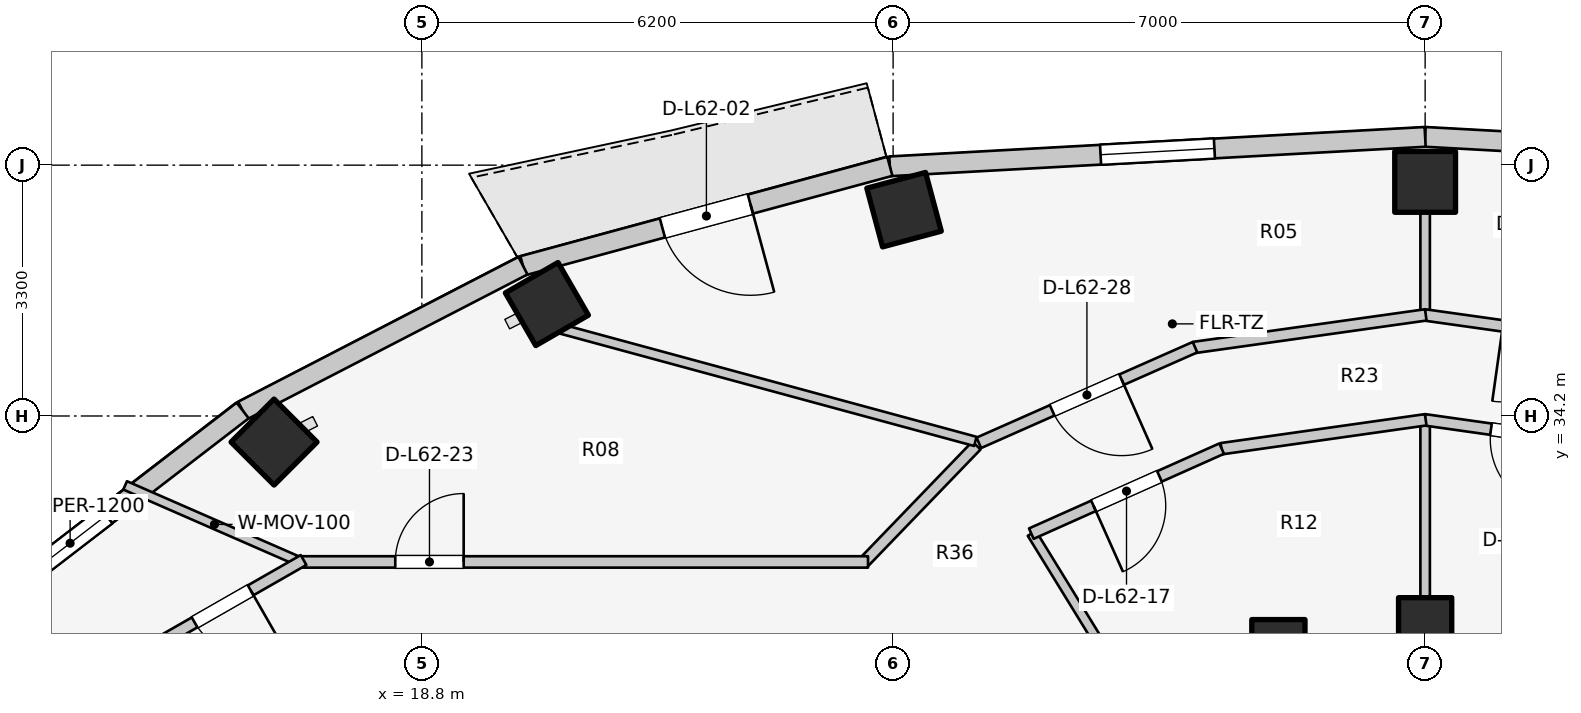
"""IFC4 building model, lengths in metres.
Left out: names, types, materials, properties, quantities, classifications, styles, units other than length and angle.
Written with IfcOpenShell. Run it as: python <this file> out.ifc"""

import sys

from ifc_helpers import new_model, si_unit, direction, frame, frame_2d, origin, origin_2d, place, context, subcontext, project, spatial, rectangle, extrude, element, fill, save


model = new_model("IFC4")
c1 = context("Model", 3, precision=1e-05, world=origin(), true_north=direction((0.0, 1.0)))
c2 = subcontext(c1, "Body", "Model", "MODEL_VIEW")
j1 = project(units=[si_unit("LENGTHUNIT", "METRE"), si_unit("PLANEANGLEUNIT", "RADIAN")], contexts=[c1])
p1 = place(None, origin())
s1 = spatial("IfcSite", under=j1, at=p1, CompositionType="ELEMENT")
p2 = place(p1, origin())
s2 = spatial("IfcBuilding", under=s1, at=p2, CompositionType="ELEMENT")
p3 = place(p2, frame((0.0, 0.0, 204.7)))
s3 = spatial("IfcBuildingStorey", under=s2, at=p3, CompositionType="ELEMENT", Elevation=204.7)
p4 = place(p3, frame((32.0, 31.46, 0.0), z_axis=(0.0, 0.0, 1.0), x_axis=(1.0, 0.0, 0.0)))
e1 = element("IfcColumn", 1, at=p4, inside=s3, PredefinedType="COLUMN", context=c2, shape_type="SweptSolid", body=[
    extrude(rectangle(XDim=0.7, YDim=0.7, at=origin_2d()), origin(), (0.0, 0.0, 1.0), 3.1),
])
p5 = place(p3, frame((32.0, 37.28, 0.0), z_axis=(0.0, 0.0, 1.0), x_axis=(0.0, 1.0, 0.0)))
e2 = element("IfcColumn", 2, at=p5, inside=s3, PredefinedType="COLUMN", context=c2, shape_type="SweptSolid", body=[
    extrude(rectangle(XDim=0.8, YDim=0.8, at=origin_2d()), origin(), (0.0, 0.0, 1.0), 3.1),
])
p6 = place(p3, frame((30.069, 31.172, 0.0), z_axis=(0.0, 0.0, 1.0), x_axis=(1.0, 0.0, 0.0)))
e3 = element("IfcColumn", 3, at=p6, inside=s3, PredefinedType="COLUMN", context=c2, shape_type="SweptSolid", body=[
    extrude(rectangle(XDim=0.7, YDim=0.7, at=origin_2d()), origin(), (0.0, 0.0, 1.0), 3.1),
])
for number, where, z_axis, x_axis in (
    (4, (25.144, 36.914, 0.0), (0.0, 0.0, 1.0), (-0.259, 0.966, 0.0)),
    (5, (20.445, 35.673, 0.0), (0.0, 0.0, 1.0), (-0.5, 0.866, 0.0)),
    (6, (16.855, 33.857, 0.0), (0.0, 0.0, 1.0), (-0.707, 0.707, 0.0)),
):
    element("IfcColumn", number, at=place(p3, frame(where, z_axis=z_axis, x_axis=x_axis)), inside=s3, PredefinedType="COLUMN", context=c2, shape_type="SweptSolid", body=[
        extrude(rectangle(XDim=0.8, YDim=0.8, at=origin_2d()), origin(), (0.0, 0.0, 1.0), 3.1),
    ])
p7 = place(p3, frame((39.043, 37.485, 0.0), z_axis=(0.0, 0.0, 1.0), x_axis=(-0.998490239527, 0.054929423535, 0.0)))
e7 = element("IfcWall", 7, at=p7, inside=s3, PredefinedType="STANDARD", context=c2, shape_type="SweptSolid", body=[
    extrude(rectangle(XDim=7.054, YDim=0.26, at=frame_2d((3.527, 0.0))), origin(), (0.0, 0.0, 1.0), 2.85),
])
p8 = place(p7, frame((2.777, 0.0, 0.75)))
e8 = element("IfcOpeningElement", 8, at=p8, cuts=e7, PredefinedType="OPENING", context=c2, shape_type="SweptSolid", body=[
    extrude(rectangle(XDim=1.5, YDim=1.6, at=frame_2d((0.75, 0.8))), frame((0.0, 0.14, 0.0), z_axis=(0.0, -1.0, 0.0), x_axis=(1.0, 0.0, 0.0)), (0.0, 0.0, 1.0), 0.28),
])
p9 = place(p3, frame((32.0, 37.872, 0.0), z_axis=(0.0, 0.0, 1.0), x_axis=(-0.998490239527, -0.054929423535, 0.0)))
e9 = element("IfcWall", 9, at=p9, inside=s3, PredefinedType="STANDARD", context=c2, shape_type="SweptSolid", body=[
    extrude(rectangle(XDim=7.054, YDim=0.26, at=frame_2d((3.527, 0.0))), origin(), (0.0, 0.0, 1.0), 2.85),
])
p10 = place(p9, frame((2.777, 0.0, 0.75)))
e10 = element("IfcOpeningElement", 10, at=p10, cuts=e9, PredefinedType="OPENING", context=c2, shape_type="SweptSolid", body=[
    extrude(rectangle(XDim=1.5, YDim=1.6, at=frame_2d((0.75, 0.8))), frame((0.0, 0.14, 0.0), z_axis=(0.0, -1.0, 0.0), x_axis=(1.0, 0.0, 0.0)), (0.0, 0.0, 1.0), 0.28),
])
p11 = place(p3, frame((24.957, 37.485, 0.0), z_axis=(0.0, 0.0, 1.0), x_axis=(-0.965213026382, -0.261464746576, 0.0)))
e11 = element("IfcWall", 11, at=p11, inside=s3, PredefinedType="STANDARD", context=c2, shape_type="SweptSolid", body=[
    extrude(rectangle(XDim=5.001, YDim=0.26, at=frame_2d((2.5, 0.0))), origin(), (0.0, 0.0, 1.0), 2.88),
])
p12 = place(p11, frame((1.9, 0.0, 0.0)))
e12 = element("IfcOpeningElement", 12, at=p12, cuts=e11, PredefinedType="OPENING", context=c2, shape_type="SweptSolid", body=[
    extrude(rectangle(XDim=1.2, YDim=2.2, at=frame_2d((0.6, 1.1))), frame((0.0, 0.14, 0.0), z_axis=(0.0, -1.0, 0.0), x_axis=(1.0, 0.0, 0.0)), (0.0, 0.0, 1.0), 0.28),
])
p13 = place(p3, frame((20.13, 36.177, 0.0), z_axis=(0.0, 0.0, 1.0), x_axis=(-0.88849146803, -0.458893137057, 0.0)))
e13 = element("IfcWall", 13, at=p13, inside=s3, PredefinedType="STANDARD", context=c2, shape_type="SweptSolid", body=[
    extrude(rectangle(XDim=4.15, YDim=0.26, at=frame_2d((2.075, 0.0))), origin(), (0.0, 0.0, 1.0), 2.85),
])
p14 = place(p3, frame((16.442, 34.272, 0.0), z_axis=(0.0, 0.0, 1.0), x_axis=(-0.792713817907, -0.609593965603, 0.0)))
e14 = element("IfcWall", 14, at=p14, inside=s3, PredefinedType="STANDARD", context=c2, shape_type="SweptSolid", body=[
    extrude(rectangle(XDim=4.041, YDim=0.26, at=frame_2d((2.021, 0.0))), origin(), (0.0, 0.0, 1.0), 2.85),
])
p15 = place(p14, frame((2.264, 0.0, 0.75)))
e15 = element("IfcOpeningElement", 15, at=p15, cuts=e14, PredefinedType="OPENING", context=c2, shape_type="SweptSolid", body=[
    extrude(rectangle(XDim=1.2, YDim=1.5, at=frame_2d((0.6, 0.75))), frame((0.0, 0.14, 0.0), z_axis=(0.0, -1.0, 0.0), x_axis=(1.0, 0.0, 0.0)), (0.0, 0.0, 1.0), 0.28),
])
p16 = place(p3, frame((32.0, 31.1, 0.0), z_axis=(0.0, 0.0, 1.0), x_axis=(0.0, 1.0, 0.0)))
e16 = element("IfcWall", 16, at=p16, inside=s3, PredefinedType="PARTITIONING", context=c2, shape_type="SweptSolid", body=[
    extrude(rectangle(XDim=3.05, YDim=0.125, at=frame_2d((1.525, 0.0))), origin(), (0.0, 0.0, 1.0), 2.376),
])
p17 = place(p3, frame((28.45, 30.015, 0.0), z_axis=(0.0, 0.0, 1.0), x_axis=(-0.523992004803, 0.851723182086, 0.0)))
e17 = element("IfcWall", 17, at=p17, inside=s3, PredefinedType="PARTITIONING", context=c2, shape_type="SweptSolid", body=[
    extrude(rectangle(XDim=3.101, YDim=0.125, at=frame_2d((1.551, 0.0))), origin(), (0.0, 0.0, 1.0), 2.376),
])
p18 = place(p3, frame((34.68, 33.77, 0.0), z_axis=(0.0, 0.0, 1.0), x_axis=(-0.990132151456, 0.140136799779, 0.0)))
e18 = element("IfcWall", 18, at=p18, inside=s3, PredefinedType="PARTITIONING", context=c2, shape_type="SweptSolid", body=[
    extrude(rectangle(XDim=2.714, YDim=0.15, at=frame_2d((1.357, 0.0))), origin(), (0.0, 0.0, 1.0), 2.376),
])
p19 = place(p18, frame((0.882, 0.0, 0.0)))
e19 = element("IfcOpeningElement", 19, at=p19, cuts=e18, PredefinedType="OPENING", context=c2, shape_type="SweptSolid", body=[
    extrude(rectangle(XDim=0.95, YDim=2.1, at=frame_2d((0.475, 1.05))), frame((0.0, 0.085, 0.0), z_axis=(0.0, -1.0, 0.0), x_axis=(1.0, 0.0, 0.0)), (0.0, 0.0, 1.0), 0.17),
])
p20 = place(p3, frame((32.007, 34.15, 0.0), z_axis=(0.0, 0.0, 1.0), x_axis=(-0.990132151456, -0.140136799779, 0.0)))
e20 = element("IfcWall", 20, at=p20, inside=s3, PredefinedType="PARTITIONING", context=c2, shape_type="SweptSolid", body=[
    extrude(rectangle(XDim=2.714, YDim=0.15, at=frame_2d((1.357, 0.0))), origin(), (0.0, 0.0, 1.0), 2.376),
])
p21 = place(p3, frame((29.323, 33.771, 0.0), z_axis=(0.0, 0.0, 1.0), x_axis=(-0.913120130558, -0.407690602257, 0.0)))
e21 = element("IfcWall", 21, at=p21, inside=s3, PredefinedType="PARTITIONING", context=c2, shape_type="SweptSolid", body=[
    extrude(rectangle(XDim=2.743, YDim=0.15, at=frame_2d((1.371, 0.0))), origin(), (0.0, 0.0, 1.0), 2.376),
])
p22 = place(p21, frame((0.896, 0.0, 0.0)))
e22 = element("IfcOpeningElement", 22, at=p22, cuts=e21, PredefinedType="OPENING", context=c2, shape_type="SweptSolid", body=[
    extrude(rectangle(XDim=0.95, YDim=2.1, at=frame_2d((0.475, 1.05))), frame((0.0, 0.085, 0.0), z_axis=(0.0, -1.0, 0.0), x_axis=(1.0, 0.0, 0.0)), (0.0, 0.0, 1.0), 0.17),
])
p23 = place(p3, frame((17.246, 32.26, 0.0), z_axis=(0.0, 0.0, 1.0), x_axis=(-0.916294929952, 0.400504183928, 0.0)))
e23 = element("IfcWall", 23, at=p23, inside=s3, PredefinedType="MOVABLE", context=c2, shape_type="SweptSolid", body=[
    extrude(rectangle(XDim=2.564, YDim=0.12, at=frame_2d((1.282, 0.0))), origin(), (0.0, 0.0, 1.0), 2.22),
])
p24 = place(p3, frame((26.097, 33.812, 0.0), z_axis=(0.0, 0.0, 1.0), x_axis=(-0.694032962553, -0.719943224768, 0.0)))
e24 = element("IfcWall", 24, at=p24, inside=s3, PredefinedType="PARTITIONING", context=c2, shape_type="SweptSolid", body=[
    extrude(rectangle(XDim=2.158, YDim=0.15, at=frame_2d((1.079, 0.0))), origin(), (0.0, 0.0, 1.0), 2.376),
])
p25 = place(p3, frame((17.15, 32.28, 0.0), z_axis=(0.0, 0.0, 1.0), x_axis=(1.0, 0.0, 0.0)))
e25 = element("IfcWall", 25, at=p25, inside=s3, PredefinedType="PARTITIONING", context=c2, shape_type="SweptSolid", body=[
    extrude(rectangle(XDim=7.52, YDim=0.15, at=frame_2d((3.76, 0.0))), origin(), (0.0, 0.0, 1.0), 2.376),
])
p26 = place(p25, frame((1.3, 0.0, 0.0)))
e26 = element("IfcOpeningElement", 26, at=p26, cuts=e25, PredefinedType="OPENING", context=c2, shape_type="SweptSolid", body=[
    extrude(rectangle(XDim=0.9, YDim=2.1, at=frame_2d((0.45, 1.05))), frame((0.0, 0.085, 0.0), z_axis=(0.0, -1.0, 0.0), x_axis=(1.0, 0.0, 0.0)), (0.0, 0.0, 1.0), 0.17),
])
p27 = place(p3, frame((17.243, 32.305, 0.0), z_axis=(0.0, 0.0, 1.0), x_axis=(-0.867991349648, -0.496579315857, 0.0)))
e27 = element("IfcWall", 27, at=p27, inside=s3, PredefinedType="PARTITIONING", context=c2, shape_type="SweptSolid", body=[
    extrude(rectangle(XDim=2.567, YDim=0.15, at=frame_2d((1.283, 0.0))), origin(), (0.0, 0.0, 1.0), 2.22),
])
p28 = place(p27, frame((0.802, 0.0, 0.0)))
e28 = element("IfcOpeningElement", 28, at=p28, cuts=e27, PredefinedType="OPENING", context=c2, shape_type="SweptSolid", body=[
    extrude(rectangle(XDim=0.85, YDim=2.05, at=frame_2d((0.425, 1.025))), frame((0.0, 0.085, 0.0), z_axis=(0.0, -1.0, 0.0), x_axis=(1.0, 0.0, 0.0)), (0.0, 0.0, 1.0), 0.17),
])
p29 = place(p3, frame((32.0, 35.585, 0.0), z_axis=(0.0, 0.0, 1.0), x_axis=(0.0, 1.0, 0.0)))
e29 = element("IfcWall", 29, at=p29, inside=s3, PredefinedType="PARTITIONING", context=c2, shape_type="SweptSolid", body=[
    extrude(rectangle(XDim=1.315, YDim=0.125, at=frame_2d((0.657, 0.0))), origin(), (0.0, 0.0, 1.0), 2.376),
])
p30 = place(p3, frame((26.082, 33.866, 0.0), z_axis=(0.0, 0.0, 1.0), x_axis=(-0.965109390289, 0.261847025523, 0.0)))
e30 = element("IfcWall", 30, at=p30, inside=s3, PredefinedType="PARTITIONING", context=c2, shape_type="SweptSolid", body=[
    extrude(rectangle(XDim=5.644, YDim=0.125, at=frame_2d((2.822, 0.0))), origin(), (0.0, 0.0, 1.0), 2.376),
])
p31 = place(p3, frame((35.044, 35.101, 0.0), z_axis=(0.0, 0.0, 1.0), x_axis=(-0.990257602807, 0.139247549651, 0.0)))
e31 = element("IfcWall", 31, at=p31, inside=s3, PredefinedType="PARTITIONING", context=c2, shape_type="SweptSolid", body=[
    extrude(rectangle(XDim=3.082, YDim=0.15, at=frame_2d((1.541, 0.0))), origin(), (0.0, 0.0, 1.0), 2.376),
])
p32 = place(p31, frame((1.041, 0.0, 0.0)))
e32 = element("IfcOpeningElement", 32, at=p32, cuts=e31, PredefinedType="OPENING", context=c2, shape_type="SweptSolid", body=[
    extrude(rectangle(XDim=1.0, YDim=2.1, at=frame_2d((0.5, 1.05))), frame((0.0, 0.085, 0.0), z_axis=(0.0, -1.0, 0.0), x_axis=(1.0, 0.0, 0.0)), (0.0, 0.0, 1.0), 0.17),
])
p33 = place(p3, frame((32.008, 35.53, 0.0), z_axis=(0.0, 0.0, 1.0), x_axis=(-0.990257602807, -0.139247549651, 0.0)))
e33 = element("IfcWall", 33, at=p33, inside=s3, PredefinedType="PARTITIONING", context=c2, shape_type="SweptSolid", body=[
    extrude(rectangle(XDim=3.082, YDim=0.15, at=frame_2d((1.541, 0.0))), origin(), (0.0, 0.0, 1.0), 2.376),
])
p34 = place(p3, frame((28.972, 35.105, 0.0), z_axis=(0.0, 0.0, 1.0), x_axis=(-0.914490094652, -0.40460828808, 0.0)))
e34 = element("IfcWall", 34, at=p34, inside=s3, PredefinedType="PARTITIONING", context=c2, shape_type="SweptSolid", body=[
    extrude(rectangle(XDim=3.11, YDim=0.15, at=frame_2d((1.555, 0.0))), origin(), (0.0, 0.0, 1.0), 2.376),
])
p35 = place(p34, frame((1.055, 0.0, 0.0)))
e35 = element("IfcOpeningElement", 35, at=p35, cuts=e34, PredefinedType="OPENING", context=c2, shape_type="SweptSolid", body=[
    extrude(rectangle(XDim=1.0, YDim=2.1, at=frame_2d((0.5, 1.05))), frame((0.0, 0.085, 0.0), z_axis=(0.0, -1.0, 0.0), x_axis=(1.0, 0.0, 0.0)), (0.0, 0.0, 1.0), 0.17),
])
p36 = place(p10, origin())
e36 = element("IfcWindow", 36, at=p36, inside=s3, PartitioningType="SINGLE_PANEL", PredefinedType="WINDOW", context=c2, shape_type="SweptSolid", body=[
    extrude(rectangle(XDim=1.5, YDim=1.6, at=frame_2d((0.75, 0.8))), frame((0.0, 0.03, 0.0), z_axis=(0.0, -1.0, 0.0), x_axis=(1.0, 0.0, 0.0)), (0.0, 0.0, 1.0), 0.06),
])
fill(e10, e36)
p37 = place(p12, origin())
e37 = element("IfcDoor", 37, at=p37, inside=s3, OperationType="SINGLE_SWING_LEFT", PredefinedType="DOOR", context=c2, shape_type="SweptSolid", body=[
    extrude(rectangle(XDim=1.2, YDim=2.2, at=frame_2d((0.6, 1.1))), frame((0.0, 0.025, 0.0), z_axis=(0.0, -1.0, 0.0), x_axis=(1.0, 0.0, 0.0)), (0.0, 0.0, 1.0), 0.05),
])
fill(e12, e37)
p38 = place(p15, origin())
e38 = element("IfcWindow", 38, at=p38, inside=s3, PartitioningType="SINGLE_PANEL", PredefinedType="WINDOW", context=c2, shape_type="SweptSolid", body=[
    extrude(rectangle(XDim=1.2, YDim=1.5, at=frame_2d((0.6, 0.75))), frame((0.0, 0.03, 0.0), z_axis=(0.0, -1.0, 0.0), x_axis=(1.0, 0.0, 0.0)), (0.0, 0.0, 1.0), 0.06),
])
fill(e15, e38)
p39 = place(p19, origin())
e39 = element("IfcDoor", 39, at=p39, inside=s3, OperationType="SINGLE_SWING_LEFT", PredefinedType="DOOR", context=c2, shape_type="SweptSolid", body=[
    extrude(rectangle(XDim=0.95, YDim=2.1, at=frame_2d((0.475, 1.05))), frame((0.0, 0.025, 0.0), z_axis=(0.0, -1.0, 0.0), x_axis=(1.0, 0.0, 0.0)), (0.0, 0.0, 1.0), 0.05),
])
fill(e19, e39)
p40 = place(p22, origin())
e40 = element("IfcDoor", 40, at=p40, inside=s3, OperationType="SINGLE_SWING_RIGHT", PredefinedType="DOOR", context=c2, shape_type="SweptSolid", body=[
    extrude(rectangle(XDim=0.95, YDim=2.1, at=frame_2d((0.475, 1.05))), frame((0.0, 0.025, 0.0), z_axis=(0.0, -1.0, 0.0), x_axis=(1.0, 0.0, 0.0)), (0.0, 0.0, 1.0), 0.05),
])
fill(e22, e40)
p41 = place(p26, origin())
e41 = element("IfcDoor", 41, at=p41, inside=s3, OperationType="SINGLE_SWING_RIGHT", PredefinedType="DOOR", context=c2, shape_type="SweptSolid", body=[
    extrude(rectangle(XDim=0.9, YDim=2.1, at=frame_2d((0.45, 1.05))), frame((0.0, 0.025, 0.0), z_axis=(0.0, -1.0, 0.0), x_axis=(1.0, 0.0, 0.0)), (0.0, 0.0, 1.0), 0.05),
])
fill(e26, e41)
p42 = place(p28, origin())
e42 = element("IfcDoor", 42, at=p42, inside=s3, OperationType="SINGLE_SWING_LEFT", PredefinedType="DOOR", context=c2, shape_type="SweptSolid", body=[
    extrude(rectangle(XDim=0.85, YDim=2.05, at=frame_2d((0.425, 1.025))), frame((0.0, 0.025, 0.0), z_axis=(0.0, -1.0, 0.0), x_axis=(1.0, 0.0, 0.0)), (0.0, 0.0, 1.0), 0.05),
])
fill(e28, e42)
p43 = place(p35, origin())
e43 = element("IfcDoor", 43, at=p43, inside=s3, OperationType="SINGLE_SWING_LEFT", PredefinedType="DOOR", context=c2, shape_type="SweptSolid", body=[
    extrude(rectangle(XDim=1.0, YDim=2.1, at=frame_2d((0.5, 1.05))), frame((0.0, 0.025, 0.0), z_axis=(0.0, -1.0, 0.0), x_axis=(1.0, 0.0, 0.0)), (0.0, 0.0, 1.0), 0.05),
])
fill(e35, e43)
save(model, sys.argv[1])
